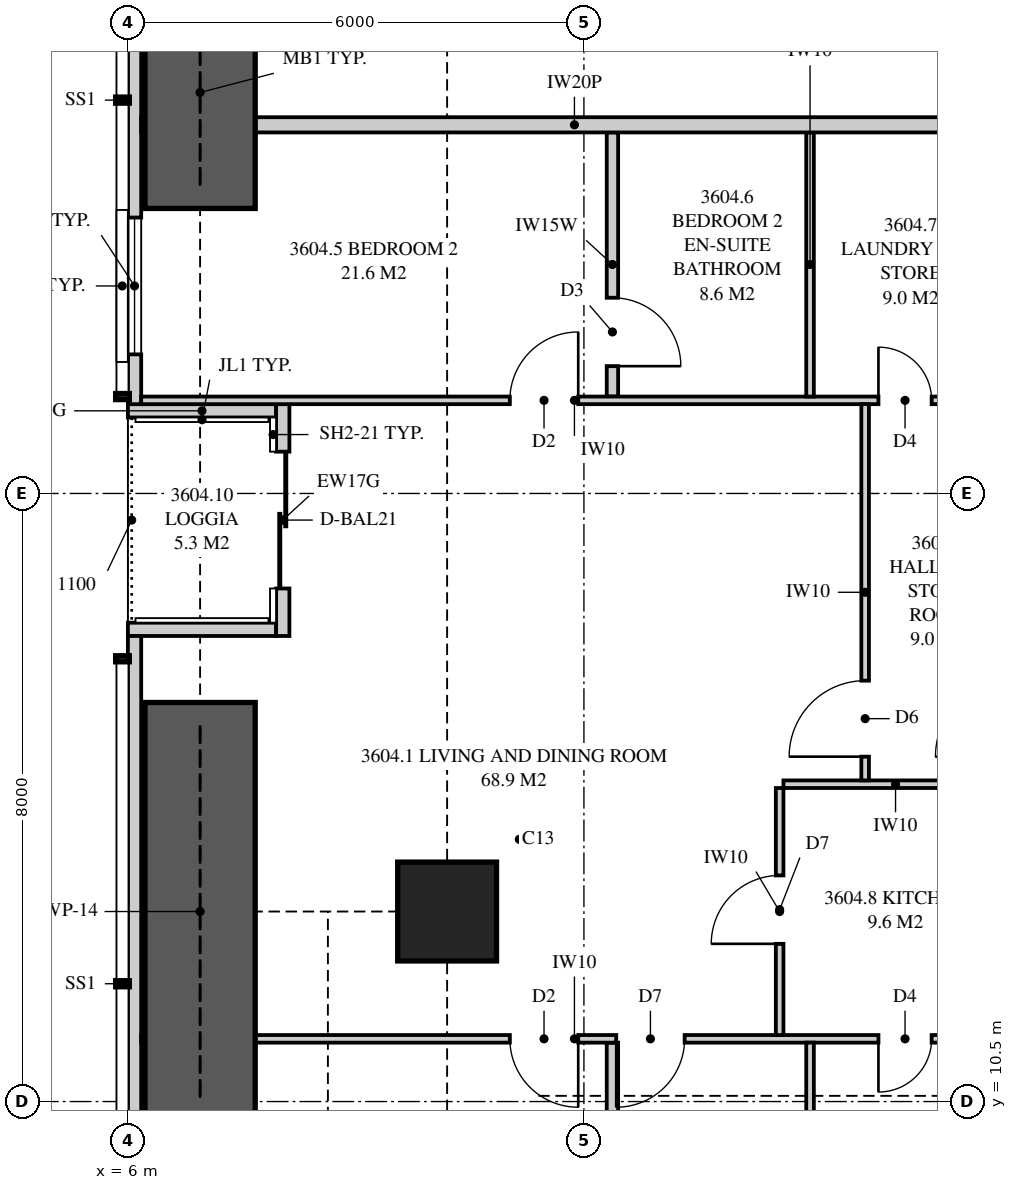
"""IFC4 building model, lengths in metres.
Left out: names, types, materials, properties, quantities, classifications, styles, units other than length and angle.
Written with IfcOpenShell. Run it as: python <this file> out.ifc"""

import sys

from ifc_helpers import new_model, si_unit, direction, frame, frame_2d, origin, origin_2d, place, context, subcontext, project, spatial, polyline, rectangle, outline, extrude, element, fill, save


model = new_model("IFC4")
c1 = context("Model", 3, precision=1e-05, world=origin(), true_north=direction((0.0, 1.0)))
c2 = subcontext(c1, "Body", "Model", "MODEL_VIEW")
j1 = project(units=[si_unit("LENGTHUNIT", "METRE"), si_unit("PLANEANGLEUNIT", "RADIAN")], contexts=[c1])
p1 = place(None, origin())
s1 = spatial("IfcSite", under=j1, at=p1, CompositionType="ELEMENT")
p2 = place(p1, origin())
s2 = spatial("IfcBuilding", under=s1, at=p2, CompositionType="ELEMENT")
p3 = place(p2, frame((0.0, 0.0, 131.65)))
s3 = spatial("IfcBuildingStorey", under=s2, at=p3, CompositionType="ELEMENT", Elevation=131.65)
p4 = place(p3, frame((10.2, 13.0, 0.0), z_axis=(0.0, 0.0, 1.0), x_axis=(1.0, 0.0, 0.0)))
e1 = element("IfcColumn", 1, at=p4, inside=s3, PredefinedType="COLUMN", context=c2, shape_type="SweptSolid", body=[
    extrude(rectangle(XDim=1.3, YDim=1.3, at=origin_2d()), origin(), (0.0, 0.0, 1.0), 3.35),
])
p5 = place(p3, frame((6.087, 34.949, 0.0), z_axis=(0.0, 0.0, 1.0), x_axis=(0.0, -1.0, 0.0)))
e2 = element("IfcWall", 2, at=p5, inside=s3, PredefinedType="SOLIDWALL", context=c2, shape_type="SweptSolid", body=[
    extrude(outline(polyline([(0.0, 0.0), (15.274, 0.0), (15.274, 2.15), (9.949, 2.15), (9.949, 3.11), (9.823, 3.11), (9.823, 2.15), (9.73, 2.15), (9.73, 3.11), (0.0, 3.11), (0.0, 0.0)])), frame((0.0, 0.087, 0.0), z_axis=(0.0, -1.0, 0.0), x_axis=(1.0, 0.0, 0.0)), (0.0, 0.0, 1.0), 0.175),
])
p6 = place(p5, frame((2.618, 0.0, 0.4)))
e3 = element("IfcOpeningElement", 3, at=p6, cuts=e2, PredefinedType="OPENING", context=c2, shape_type="SweptSolid", body=[
    extrude(rectangle(XDim=1.8, YDim=1.7, at=frame_2d((0.9, 0.85))), frame((0.0, 0.097, 0.0), z_axis=(0.0, -1.0, 0.0), x_axis=(1.0, 0.0, 0.0)), (0.0, 0.0, 1.0), 0.195),
])
p7 = place(p5, frame((5.874, 0.0, 0.4)))
e4 = element("IfcOpeningElement", 4, at=p7, cuts=e2, PredefinedType="OPENING", context=c2, shape_type="SweptSolid", body=[
    extrude(rectangle(XDim=1.2, YDim=1.7, at=frame_2d((0.6, 0.85))), frame((0.0, 0.097, 0.0), z_axis=(0.0, -1.0, 0.0), x_axis=(1.0, 0.0, 0.0)), (0.0, 0.0, 1.0), 0.195),
])
p8 = place(p5, frame((12.819, 0.0, 0.4)))
e5 = element("IfcOpeningElement", 5, at=p8, cuts=e2, PredefinedType="OPENING", context=c2, shape_type="SweptSolid", body=[
    extrude(rectangle(XDim=1.8, YDim=1.7, at=frame_2d((0.9, 0.85))), frame((0.0, 0.097, 0.0), z_axis=(0.0, -1.0, 0.0), x_axis=(1.0, 0.0, 0.0)), (0.0, 0.0, 1.0), 0.195),
])
p9 = place(p3, frame((6.087, 16.625, 0.0), z_axis=(0.0, 0.0, 1.0), x_axis=(0.0, -1.0, 0.0)))
e6 = element("IfcWall", 6, at=p9, inside=s3, PredefinedType="SOLIDWALL", context=c2, shape_type="SweptSolid", body=[
    extrude(outline(polyline([(0.0, 0.0), (13.574, 0.0), (13.574, 3.11), (3.844, 3.11), (3.844, 2.15), (3.751, 2.15), (3.751, 3.11), (3.625, 3.11), (3.625, 2.15), (0.0, 2.15), (0.0, 0.0)])), frame((0.0, 0.087, 0.0), z_axis=(0.0, -1.0, 0.0), x_axis=(1.0, 0.0, 0.0)), (0.0, 0.0, 1.0), 0.175),
])
p10 = place(p9, frame((6.5, 0.0, 0.4)))
e7 = element("IfcOpeningElement", 7, at=p10, cuts=e6, PredefinedType="OPENING", context=c2, shape_type="SweptSolid", body=[
    extrude(rectangle(XDim=1.8, YDim=1.7, at=frame_2d((0.9, 0.85))), frame((0.0, 0.097, 0.0), z_axis=(0.0, -1.0, 0.0), x_axis=(1.0, 0.0, 0.0)), (0.0, 0.0, 1.0), 0.195),
])
p11 = place(p9, frame((9.656, 0.0, 0.4)))
e8 = element("IfcOpeningElement", 8, at=p11, cuts=e6, PredefinedType="OPENING", context=c2, shape_type="SweptSolid", body=[
    extrude(rectangle(XDim=1.8, YDim=1.7, at=frame_2d((0.9, 0.85))), frame((0.0, 0.097, 0.0), z_axis=(0.0, -1.0, 0.0), x_axis=(1.0, 0.0, 0.0)), (0.0, 0.0, 1.0), 0.195),
])
p12 = place(p3, frame((8.038, 19.675, 0.0), z_axis=(0.0, 0.0, 1.0), x_axis=(0.0, -1.0, 0.0)))
e9 = element("IfcWall", 9, at=p12, inside=s3, PredefinedType="SOLIDWALL", context=c2, shape_type="SweptSolid", body=[
    extrude(rectangle(XDim=3.05, YDim=0.175, at=frame_2d((1.525, 0.0))), origin(), (0.0, 0.0, 1.0), 3.11),
])
p13 = place(p12, frame((0.625, 0.0, 0.0)))
e10 = element("IfcOpeningElement", 10, at=p13, cuts=e9, PredefinedType="OPENING", context=c2, shape_type="SweptSolid", body=[
    extrude(rectangle(XDim=1.8, YDim=2.1, at=frame_2d((0.9, 1.05))), frame((0.0, 0.097, 0.0), z_axis=(0.0, -1.0, 0.0), x_axis=(1.0, 0.0, 0.0)), (0.0, 0.0, 1.0), 0.195),
])
for number, where, z_axis, x_axis in (
    (11, (6.0, 19.587, 0.0), (0.0, 0.0, 1.0), (1.0, 0.0, 0.0)),
    (12, (6.0, 16.712, 0.0), (0.0, 0.0, 1.0), (1.0, 0.0, 0.0)),
):
    element("IfcWall", number, at=place(p3, frame(where, z_axis=z_axis, x_axis=x_axis)), inside=s3, PredefinedType="SOLIDWALL", context=c2, shape_type="SweptSolid", body=[
        extrude(outline(polyline([(0.0, 0.0), (1.95, 0.0), (1.95, 3.11), (1.75, 3.11), (1.75, 2.15), (0.15, 2.15), (0.15, 3.11), (0.0, 3.11), (0.0, 0.0)])), frame((0.0, 0.087, 0.0), z_axis=(0.0, -1.0, 0.0), x_axis=(1.0, 0.0, 0.0)), (0.0, 0.0, 1.0), 0.175),
    ])
p14 = place(p3, frame((6.175, 23.35, 0.0), z_axis=(0.0, 0.0, 1.0), x_axis=(1.0, 0.0, 0.0)))
e13 = element("IfcWall", 13, at=p14, inside=s3, PredefinedType="PARTITIONING", context=c2, shape_type="SweptSolid", body=[
    extrude(outline(polyline([(0.529, 2.15), (0.0, 2.15), (0.0, 0.0), (0.529, 0.0), (0.529, 0.376), (1.021, 0.376), (1.021, 0.0), (11.4, 0.0), (11.4, 3.11), (5.335, 3.11), (5.335, 2.51), (2.715, 2.51), (2.715, 3.11), (1.685, 3.11), (1.685, 2.15), (1.021, 2.15), (1.021, 1.774), (0.529, 1.774), (0.529, 2.15)])), frame((0.0, 0.1, 0.0), z_axis=(0.0, -1.0, 0.0), x_axis=(1.0, 0.0, 0.0)), (0.0, 0.0, 1.0), 0.2),
])
p15 = place(p3, frame((6.175, 11.325, 0.0), z_axis=(0.0, 0.0, 1.0), x_axis=(1.0, 0.0, 0.0)))
e14 = element("IfcWall", 14, at=p15, inside=s3, PredefinedType="PARTITIONING", context=c2, shape_type="SweptSolid", body=[
    extrude(outline(polyline([(0.175, 3.11), (0.0, 3.11), (0.0, 0.0), (0.529, 0.0), (0.529, 0.325), (1.021, 0.325), (1.021, 0.0), (11.4, 0.0), (11.4, 3.11), (5.285, 3.11), (5.285, 2.51), (2.765, 2.51), (2.765, 3.11), (2.744, 3.11), (2.744, 2.541), (2.169, 2.541), (2.169, 3.11), (1.918, 3.11), (1.918, 2.15), (1.021, 2.15), (1.021, 1.825), (0.529, 1.825), (0.529, 2.15), (0.175, 2.15), (0.175, 3.11)])), frame((0.0, 0.05, 0.0), z_axis=(0.0, -1.0, 0.0), x_axis=(1.0, 0.0, 0.0)), (0.0, 0.0, 1.0), 0.1),
])
p16 = place(p15, frame((4.85, 0.0, 0.0)))
e15 = element("IfcOpeningElement", 15, at=p16, cuts=e14, PredefinedType="OPENING", context=c2, shape_type="SweptSolid", body=[
    extrude(rectangle(XDim=0.9, YDim=2.1, at=frame_2d((0.45, 1.05))), frame((0.0, 0.06, 0.0), z_axis=(0.0, -1.0, 0.0), x_axis=(1.0, 0.0, 0.0)), (0.0, 0.0, 1.0), 0.12),
])
p17 = place(p15, frame((6.25, 0.0, 0.0)))
e16 = element("IfcOpeningElement", 16, at=p17, cuts=e14, PredefinedType="OPENING", context=c2, shape_type="SweptSolid", body=[
    extrude(rectangle(XDim=0.9, YDim=2.1, at=frame_2d((0.45, 1.05))), frame((0.0, 0.06, 0.0), z_axis=(0.0, -1.0, 0.0), x_axis=(1.0, 0.0, 0.0)), (0.0, 0.0, 1.0), 0.12),
])
p18 = place(p15, frame((9.7, 0.0, 0.0)))
e17 = element("IfcOpeningElement", 17, at=p18, cuts=e14, PredefinedType="OPENING", context=c2, shape_type="SweptSolid", body=[
    extrude(rectangle(XDim=0.7, YDim=2.1, at=frame_2d((0.35, 1.05))), frame((0.0, 0.06, 0.0), z_axis=(0.0, -1.0, 0.0), x_axis=(1.0, 0.0, 0.0)), (0.0, 0.0, 1.0), 0.12),
])
p19 = place(p3, frame((6.175, 19.725, 0.0), z_axis=(0.0, 0.0, 1.0), x_axis=(1.0, 0.0, 0.0)))
e18 = element("IfcWall", 18, at=p19, inside=s3, PredefinedType="PARTITIONING", context=c2, shape_type="SweptSolid", body=[
    extrude(outline(polyline([(0.0, 0.0), (11.4, 0.0), (11.4, 3.11), (5.285, 3.11), (5.285, 2.51), (2.765, 2.51), (2.765, 3.11), (1.635, 3.11), (1.635, 2.15), (0.0, 2.15), (0.0, 3.11), (0.0, 0.0)])), frame((0.0, 0.05, 0.0), z_axis=(0.0, -1.0, 0.0), x_axis=(1.0, 0.0, 0.0)), (0.0, 0.0, 1.0), 0.1),
])
p20 = place(p19, frame((4.85, 0.0, 0.0)))
e19 = element("IfcOpeningElement", 19, at=p20, cuts=e18, PredefinedType="OPENING", context=c2, shape_type="SweptSolid", body=[
    extrude(rectangle(XDim=0.9, YDim=2.1, at=frame_2d((0.45, 1.05))), frame((0.0, 0.06, 0.0), z_axis=(0.0, -1.0, 0.0), x_axis=(1.0, 0.0, 0.0)), (0.0, 0.0, 1.0), 0.12),
])
p21 = place(p19, frame((9.7, 0.0, 0.0)))
e20 = element("IfcOpeningElement", 20, at=p21, cuts=e18, PredefinedType="OPENING", context=c2, shape_type="SweptSolid", body=[
    extrude(rectangle(XDim=0.7, YDim=2.1, at=frame_2d((0.35, 1.05))), frame((0.0, 0.06, 0.0), z_axis=(0.0, -1.0, 0.0), x_axis=(1.0, 0.0, 0.0)), (0.0, 0.0, 1.0), 0.12),
])
p22 = place(p3, frame((12.375, 7.825, 0.0), z_axis=(0.0, 0.0, 1.0), x_axis=(0.0, 1.0, 0.0)))
e21 = element("IfcWall", 21, at=p22, inside=s3, PredefinedType="PLUMBINGWALL", context=c2, shape_type="SweptSolid", body=[
    extrude(outline(polyline([(0.0, 0.0), (3.45, 0.0), (3.45, 3.11), (3.062, 3.11), (3.062, 2.541), (2.438, 2.541), (2.438, 3.11), (0.0, 3.11), (0.0, 0.0)])), frame((0.0, 0.075, 0.0), z_axis=(0.0, -1.0, 0.0), x_axis=(1.0, 0.0, 0.0)), (0.0, 0.0, 1.0), 0.15),
])
p23 = place(p3, frame((14.975, 7.825, 0.0), z_axis=(0.0, 0.0, 1.0), x_axis=(0.0, 1.0, 0.0)))
e22 = element("IfcWall", 22, at=p23, inside=s3, PredefinedType="PARTITIONING", context=c2, shape_type="SweptSolid", body=[
    extrude(outline(polyline([(0.0, 0.0), (3.45, 0.0), (3.45, 3.11), (3.037, 3.11), (3.037, 2.541), (2.463, 2.541), (2.463, 3.11), (0.0, 3.11), (0.0, 0.0)])), frame((0.0, 0.05, 0.0), z_axis=(0.0, -1.0, 0.0), x_axis=(1.0, 0.0, 0.0)), (0.0, 0.0, 1.0), 0.1),
])
p24 = place(p3, frame((12.375, 19.775, 0.0), z_axis=(0.0, 0.0, 1.0), x_axis=(0.0, 1.0, 0.0)))
e23 = element("IfcWall", 23, at=p24, inside=s3, PredefinedType="PLUMBINGWALL", context=c2, shape_type="SweptSolid", body=[
    extrude(rectangle(XDim=3.475, YDim=0.15, at=frame_2d((1.738, 0.0))), origin(), (0.0, 0.0, 1.0), 3.11),
])
p25 = place(p24, frame((0.4, 0.0, 0.0)))
e24 = element("IfcOpeningElement", 24, at=p25, cuts=e23, PredefinedType="OPENING", context=c2, shape_type="SweptSolid", body=[
    extrude(rectangle(XDim=0.9, YDim=2.1, at=frame_2d((0.45, 1.05))), frame((0.0, 0.085, 0.0), z_axis=(0.0, -1.0, 0.0), x_axis=(1.0, 0.0, 0.0)), (0.0, 0.0, 1.0), 0.17),
])
p26 = place(p3, frame((14.975, 19.775, 0.0), z_axis=(0.0, 0.0, 1.0), x_axis=(0.0, 1.0, 0.0)))
e25 = element("IfcWall", 25, at=p26, inside=s3, PredefinedType="PARTITIONING", context=c2, shape_type="SweptSolid", body=[
    extrude(rectangle(XDim=3.475, YDim=0.1, at=frame_2d((1.738, 0.0))), origin(), (0.0, 0.0, 1.0), 3.11),
])
p27 = place(p3, frame((14.575, 11.375, 0.0), z_axis=(0.0, 0.0, 1.0), x_axis=(0.0, 1.0, 0.0)))
e26 = element("IfcWall", 26, at=p27, inside=s3, PredefinedType="PARTITIONING", context=c2, shape_type="SweptSolid", body=[
    extrude(rectangle(XDim=3.25, YDim=0.1, at=frame_2d((1.625, 0.0))), origin(), (0.0, 0.0, 1.0), 3.11),
])
p28 = place(p27, frame((1.2, 0.0, 0.0)))
e27 = element("IfcOpeningElement", 27, at=p28, cuts=e26, PredefinedType="OPENING", context=c2, shape_type="SweptSolid", body=[
    extrude(rectangle(XDim=0.9, YDim=2.1, at=frame_2d((0.45, 1.05))), frame((0.0, 0.06, 0.0), z_axis=(0.0, -1.0, 0.0), x_axis=(1.0, 0.0, 0.0)), (0.0, 0.0, 1.0), 0.12),
])
p29 = place(p3, frame((14.625, 14.675, 0.0), z_axis=(0.0, 0.0, 1.0), x_axis=(1.0, 0.0, 0.0)))
e28 = element("IfcWall", 28, at=p29, inside=s3, PredefinedType="PARTITIONING", context=c2, shape_type="SweptSolid", body=[
    extrude(rectangle(XDim=2.95, YDim=0.1, at=frame_2d((1.475, 0.0))), origin(), (0.0, 0.0, 1.0), 3.11),
])
p30 = place(p3, frame((15.7, 14.725, 0.0), z_axis=(0.0, 0.0, 1.0), x_axis=(0.0, 1.0, 0.0)))
e29 = element("IfcWall", 29, at=p30, inside=s3, PredefinedType="PARTITIONING", context=c2, shape_type="SweptSolid", body=[
    extrude(rectangle(XDim=4.95, YDim=0.1, at=frame_2d((2.475, 0.0))), origin(), (0.0, 0.0, 1.0), 3.11),
])
p31 = place(p30, frame((0.312, 0.0, 0.0)))
e30 = element("IfcOpeningElement", 30, at=p31, cuts=e29, PredefinedType="OPENING", context=c2, shape_type="SweptSolid", body=[
    extrude(rectangle(XDim=1.0, YDim=2.1, at=frame_2d((0.5, 1.05))), frame((0.0, 0.06, 0.0), z_axis=(0.0, -1.0, 0.0), x_axis=(1.0, 0.0, 0.0)), (0.0, 0.0, 1.0), 0.12),
])
for number, where, z_axis, x_axis in (
    (31, (6.95, 22.25, 0.0), (0.0, 0.0, 1.0), (0.0, 1.0, 0.0)),
    (32, (6.95, 10.25, 0.0), (0.0, 0.0, 1.0), (0.0, 1.0, 0.0)),
):
    element("IfcWall", number, at=place(p3, frame(where, z_axis=z_axis, x_axis=x_axis)), inside=s3, PredefinedType="SHEAR", context=c2, shape_type="SweptSolid", body=[
        extrude(rectangle(XDim=5.5, YDim=1.45, at=frame_2d((2.75, 0.0))), origin(), (0.0, 0.0, 1.0), 3.35),
    ])
p32 = place(p8, origin())
e33 = element("IfcWindow", 33, at=p32, inside=s3, PartitioningType="SINGLE_PANEL", PredefinedType="WINDOW", context=c2, shape_type="SweptSolid", body=[
    extrude(rectangle(XDim=1.8, YDim=1.7, at=frame_2d((0.9, 0.85))), frame((0.0, 0.03, 0.0), z_axis=(0.0, -1.0, 0.0), x_axis=(1.0, 0.0, 0.0)), (0.0, 0.0, 1.0), 0.06),
])
fill(e5, e33)
p33 = place(p13, origin())
e34 = element("IfcDoor", 34, at=p33, inside=s3, OperationType="SLIDING_TO_LEFT", PredefinedType="DOOR", context=c2, shape_type="SweptSolid", body=[
    extrude(rectangle(XDim=1.8, YDim=2.1, at=frame_2d((0.9, 1.05))), frame((0.0, 0.025, 0.0), z_axis=(0.0, -1.0, 0.0), x_axis=(1.0, 0.0, 0.0)), (0.0, 0.0, 1.0), 0.05),
])
fill(e10, e34)
p34 = place(p16, frame((0.9, 0.0, 0.0), z_axis=(0.0, 0.0, 1.0), x_axis=(-1.0, 0.0, 0.0)))
e35 = element("IfcDoor", 35, at=p34, inside=s3, OperationType="SINGLE_SWING_LEFT", PredefinedType="DOOR", context=c2, shape_type="SweptSolid", body=[
    extrude(rectangle(XDim=0.9, YDim=2.1, at=frame_2d((0.45, 1.05))), frame((0.0, 0.025, 0.0), z_axis=(0.0, -1.0, 0.0), x_axis=(1.0, 0.0, 0.0)), (0.0, 0.0, 1.0), 0.05),
])
fill(e15, e35)
p35 = place(p17, frame((0.9, 0.0, 0.0), z_axis=(0.0, 0.0, 1.0), x_axis=(-1.0, 0.0, 0.0)))
e36 = element("IfcDoor", 36, at=p35, inside=s3, OperationType="SINGLE_SWING_RIGHT", PredefinedType="DOOR", context=c2, shape_type="SweptSolid", body=[
    extrude(rectangle(XDim=0.9, YDim=2.1, at=frame_2d((0.45, 1.05))), frame((0.0, 0.025, 0.0), z_axis=(0.0, -1.0, 0.0), x_axis=(1.0, 0.0, 0.0)), (0.0, 0.0, 1.0), 0.05),
])
fill(e16, e36)
p36 = place(p18, frame((0.7, 0.0, 0.0), z_axis=(0.0, 0.0, 1.0), x_axis=(-1.0, 0.0, 0.0)))
e37 = element("IfcDoor", 37, at=p36, inside=s3, OperationType="SINGLE_SWING_RIGHT", PredefinedType="DOOR", context=c2, shape_type="SweptSolid", body=[
    extrude(rectangle(XDim=0.7, YDim=2.1, at=frame_2d((0.35, 1.05))), frame((0.0, 0.025, 0.0), z_axis=(0.0, -1.0, 0.0), x_axis=(1.0, 0.0, 0.0)), (0.0, 0.0, 1.0), 0.05),
])
fill(e17, e37)
p37 = place(p20, origin())
e38 = element("IfcDoor", 38, at=p37, inside=s3, OperationType="SINGLE_SWING_RIGHT", PredefinedType="DOOR", context=c2, shape_type="SweptSolid", body=[
    extrude(rectangle(XDim=0.9, YDim=2.1, at=frame_2d((0.45, 1.05))), frame((0.0, 0.025, 0.0), z_axis=(0.0, -1.0, 0.0), x_axis=(1.0, 0.0, 0.0)), (0.0, 0.0, 1.0), 0.05),
])
fill(e19, e38)
p38 = place(p25, frame((0.9, 0.0, 0.0), z_axis=(0.0, 0.0, 1.0), x_axis=(-1.0, 0.0, 0.0)))
e39 = element("IfcDoor", 39, at=p38, inside=s3, OperationType="SINGLE_SWING_RIGHT", PredefinedType="DOOR", context=c2, shape_type="SweptSolid", body=[
    extrude(rectangle(XDim=0.9, YDim=2.1, at=frame_2d((0.45, 1.05))), frame((0.0, 0.025, 0.0), z_axis=(0.0, -1.0, 0.0), x_axis=(1.0, 0.0, 0.0)), (0.0, 0.0, 1.0), 0.05),
])
fill(e24, e39)
p39 = place(p21, origin())
e40 = element("IfcDoor", 40, at=p39, inside=s3, OperationType="SINGLE_SWING_LEFT", PredefinedType="DOOR", context=c2, shape_type="SweptSolid", body=[
    extrude(rectangle(XDim=0.7, YDim=2.1, at=frame_2d((0.35, 1.05))), frame((0.0, 0.025, 0.0), z_axis=(0.0, -1.0, 0.0), x_axis=(1.0, 0.0, 0.0)), (0.0, 0.0, 1.0), 0.05),
])
fill(e20, e40)
p40 = place(p28, origin())
e41 = element("IfcDoor", 41, at=p40, inside=s3, OperationType="SINGLE_SWING_LEFT", PredefinedType="DOOR", context=c2, shape_type="SweptSolid", body=[
    extrude(rectangle(XDim=0.9, YDim=2.1, at=frame_2d((0.45, 1.05))), frame((0.0, 0.025, 0.0), z_axis=(0.0, -1.0, 0.0), x_axis=(1.0, 0.0, 0.0)), (0.0, 0.0, 1.0), 0.05),
])
fill(e27, e41)
p41 = place(p31, origin())
e42 = element("IfcDoor", 42, at=p41, inside=s3, OperationType="SINGLE_SWING_LEFT", PredefinedType="DOOR", context=c2, shape_type="SweptSolid", body=[
    extrude(rectangle(XDim=1.0, YDim=2.1, at=frame_2d((0.5, 1.05))), frame((0.0, 0.025, 0.0), z_axis=(0.0, -1.0, 0.0), x_axis=(1.0, 0.0, 0.0)), (0.0, 0.0, 1.0), 0.05),
])
fill(e30, e42)
save(model, sys.argv[1])
